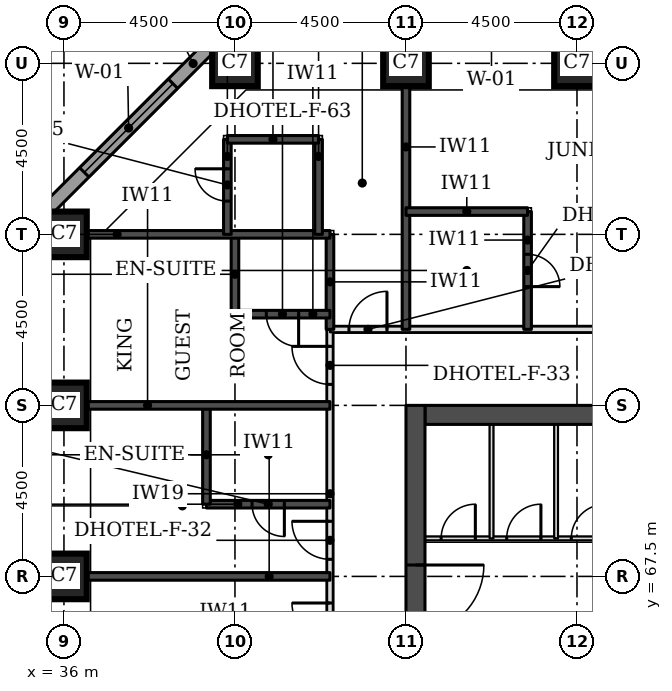
"""IFC4 building model, lengths in metres.
Left out: names, types, materials, properties, quantities, classifications, styles, units other than length and angle.
Written with IfcOpenShell. Run it as: python <this file> out.ifc"""

import sys

from ifc_helpers import new_model, si_unit, direction, frame, frame_2d, origin, origin_2d, place, context, subcontext, project, spatial, rectangle, extrude, element, fill, save


model = new_model("IFC4")
c1 = context("Model", 3, precision=1e-05, world=origin(), true_north=direction((0.0, 1.0)))
c2 = subcontext(c1, "Body", "Model", "MODEL_VIEW")
j1 = project(units=[si_unit("LENGTHUNIT", "METRE"), si_unit("PLANEANGLEUNIT", "RADIAN")], contexts=[c1])
p1 = place(None, origin())
s1 = spatial("IfcSite", under=j1, at=p1, CompositionType="ELEMENT")
p2 = place(p1, origin())
s2 = spatial("IfcBuilding", under=s1, at=p2, CompositionType="ELEMENT")
p3 = place(p2, frame((0.0, 0.0, 42.9)))
s3 = spatial("IfcBuildingStorey", under=s2, at=p3, CompositionType="ELEMENT", Elevation=42.9)
for number, where, z_axis, x_axis in (
    (1, (36.0, 67.5, 0.0), (0.0, 0.0, 1.0), (1.0, 0.0, 0.0)),
    (2, (36.0, 72.0, 0.0), (0.0, 0.0, 1.0), (1.0, 0.0, 0.0)),
    (3, (36.0, 76.5, 0.0), (0.0, 0.0, 1.0), (1.0, 0.0, 0.0)),
    (4, (40.5, 81.0, 0.0), (0.0, 0.0, 1.0), (1.0, 0.0, 0.0)),
    (5, (45.0, 81.0, 0.0), (0.0, 0.0, 1.0), (1.0, 0.0, 0.0)),
    (6, (49.5, 81.0, 0.0), (0.0, 0.0, 1.0), (1.0, 0.0, 0.0)),
):
    element("IfcColumn", number, at=place(p3, frame(where, z_axis=z_axis, x_axis=x_axis)), inside=s3, PredefinedType="COLUMN", context=c2, shape_type="SweptSolid", body=[
        extrude(rectangle(XDim=1.2, YDim=1.2, at=origin_2d()), origin(), (0.0, 0.0, 1.0), 3.3),
    ])
p4 = place(p3, frame((45.5, 71.75, 0.0), z_axis=(0.0, 0.0, 1.0), x_axis=(1.0, 0.0, 0.0)))
e7 = element("IfcWall", 7, at=p4, inside=s3, PredefinedType="SHEAR", context=c2, shape_type="SweptSolid", body=[
    extrude(rectangle(XDim=21.5, YDim=0.5, at=frame_2d((10.75, 0.0))), origin(), (0.0, 0.0, 1.0), 3.3),
])
p5 = place(p3, frame((45.25, 49.5, 0.0), z_axis=(0.0, 0.0, 1.0), x_axis=(0.0, 1.0, 0.0)))
e8 = element("IfcWall", 8, at=p5, inside=s3, PredefinedType="SHEAR", context=c2, shape_type="SweptSolid", body=[
    extrude(rectangle(XDim=22.5, YDim=0.5, at=frame_2d((11.25, 0.0))), origin(), (0.0, 0.0, 1.0), 3.3),
])
p6 = place(p5, frame((4.2, 0.0, 0.0)))
e9 = element("IfcOpeningElement", 9, at=p6, cuts=e8, PredefinedType="OPENING", context=c2, shape_type="SweptSolid", body=[
    extrude(rectangle(XDim=1.8, YDim=2.1, at=frame_2d((0.9, 1.05))), frame((0.0, 0.26, 0.0), z_axis=(0.0, -1.0, 0.0), x_axis=(1.0, 0.0, 0.0)), (0.0, 0.0, 1.0), 0.52),
])
p7 = place(p5, frame((6.9, 0.0, 0.0)))
e10 = element("IfcOpeningElement", 10, at=p7, cuts=e8, PredefinedType="OPENING", context=c2, shape_type="SweptSolid", body=[
    extrude(rectangle(XDim=1.1, YDim=2.1, at=frame_2d((0.55, 1.05))), frame((0.0, 0.26, 0.0), z_axis=(0.0, -1.0, 0.0), x_axis=(1.0, 0.0, 0.0)), (0.0, 0.0, 1.0), 0.52),
])
p8 = place(p5, frame((13.6, 0.0, 0.0)))
e11 = element("IfcOpeningElement", 11, at=p8, cuts=e8, PredefinedType="OPENING", context=c2, shape_type="SweptSolid", body=[
    extrude(rectangle(XDim=1.1, YDim=2.1, at=frame_2d((0.55, 1.05))), frame((0.0, 0.26, 0.0), z_axis=(0.0, -1.0, 0.0), x_axis=(1.0, 0.0, 0.0)), (0.0, 0.0, 1.0), 0.52),
])
p9 = place(p5, frame((16.5, 0.0, 0.0)))
e12 = element("IfcOpeningElement", 12, at=p9, cuts=e8, PredefinedType="OPENING", context=c2, shape_type="SweptSolid", body=[
    extrude(rectangle(XDim=1.8, YDim=2.1, at=frame_2d((0.9, 1.05))), frame((0.0, 0.26, 0.0), z_axis=(0.0, -1.0, 0.0), x_axis=(1.0, 0.0, 0.0)), (0.0, 0.0, 1.0), 0.52),
])
p10 = place(p3, frame((40.23, 81.826, 0.0), z_axis=(0.0, 0.0, 1.0), x_axis=(-0.707106781187, -0.707106781187, 0.0)))
e13 = element("IfcWall", 13, at=p10, inside=s3, PredefinedType="STANDARD", context=c2, shape_type="SweptSolid", body=[
    extrude(rectangle(XDim=7.151, YDim=0.35, at=frame_2d((3.576, 0.0))), origin(), (0.0, 0.0, 1.0), 3.055),
])
p11 = place(p10, frame((1.926, 0.0, 0.8)))
e14 = element("IfcOpeningElement", 14, at=p11, cuts=e13, PredefinedType="OPENING", context=c2, shape_type="SweptSolid", body=[
    extrude(rectangle(XDim=3.3, YDim=1.5, at=frame_2d((1.65, 0.75))), frame((0.0, 0.185, 0.0), z_axis=(0.0, -1.0, 0.0), x_axis=(1.0, 0.0, 0.0)), (0.0, 0.0, 1.0), 0.37),
])
p12 = place(p3, frame((43.0, 57.35, 0.0), z_axis=(0.0, 0.0, 1.0), x_axis=(0.0, 1.0, 0.0)))
e15 = element("IfcWall", 15, at=p12, inside=s3, PredefinedType="PARTITIONING", context=c2, shape_type="SweptSolid", body=[
    extrude(rectangle(XDim=16.65, YDim=0.15, at=frame_2d((8.325, 0.0))), origin(), (0.0, 0.0, 1.0), 3.08),
])
p13 = place(p12, frame((8.45, 0.0, 0.0)))
e16 = element("IfcOpeningElement", 16, at=p13, cuts=e15, PredefinedType="OPENING", context=c2, shape_type="SweptSolid", body=[
    extrude(rectangle(XDim=1.0, YDim=2.1, at=frame_2d((0.5, 1.05))), frame((0.0, 0.085, 0.0), z_axis=(0.0, -1.0, 0.0), x_axis=(1.0, 0.0, 0.0)), (0.0, 0.0, 1.0), 0.17),
])
p14 = place(p12, frame((10.6, 0.0, 0.0)))
e17 = element("IfcOpeningElement", 17, at=p14, cuts=e15, PredefinedType="OPENING", context=c2, shape_type="SweptSolid", body=[
    extrude(rectangle(XDim=1.0, YDim=2.1, at=frame_2d((0.5, 1.05))), frame((0.0, 0.085, 0.0), z_axis=(0.0, -1.0, 0.0), x_axis=(1.0, 0.0, 0.0)), (0.0, 0.0, 1.0), 0.17),
])
p15 = place(p12, frame((15.203, 0.0, 0.0)))
e18 = element("IfcOpeningElement", 18, at=p15, cuts=e15, PredefinedType="OPENING", context=c2, shape_type="SweptSolid", body=[
    extrude(rectangle(XDim=1.0, YDim=2.1, at=frame_2d((0.5, 1.05))), frame((0.0, 0.085, 0.0), z_axis=(0.0, -1.0, 0.0), x_axis=(1.0, 0.0, 0.0)), (0.0, 0.0, 1.0), 0.17),
])
p16 = place(p3, frame((43.0, 74.0, 0.0), z_axis=(0.0, 0.0, 1.0), x_axis=(1.0, 0.0, 0.0)))
e19 = element("IfcWall", 19, at=p16, inside=s3, PredefinedType="PARTITIONING", context=c2, shape_type="SweptSolid", body=[
    extrude(rectangle(XDim=26.5, YDim=0.15, at=frame_2d((13.25, 0.0))), origin(), (0.0, 0.0, 1.0), 3.08),
])
p17 = place(p16, frame((7.6, 0.0, 0.0)))
e20 = element("IfcOpeningElement", 20, at=p17, cuts=e19, PredefinedType="OPENING", context=c2, shape_type="SweptSolid", body=[
    extrude(rectangle(XDim=1.0, YDim=2.1, at=frame_2d((0.5, 1.05))), frame((0.0, 0.085, 0.0), z_axis=(0.0, -1.0, 0.0), x_axis=(1.0, 0.0, 0.0)), (0.0, 0.0, 1.0), 0.17),
])
p18 = place(p16, frame((13.65, 0.0, 0.0)))
e21 = element("IfcOpeningElement", 21, at=p18, cuts=e19, PredefinedType="OPENING", context=c2, shape_type="SweptSolid", body=[
    extrude(rectangle(XDim=1.0, YDim=2.1, at=frame_2d((0.5, 1.05))), frame((0.0, 0.085, 0.0), z_axis=(0.0, -1.0, 0.0), x_axis=(1.0, 0.0, 0.0)), (0.0, 0.0, 1.0), 0.17),
])
p19 = place(p16, frame((23.05, 0.0, 0.0)))
e22 = element("IfcOpeningElement", 22, at=p19, cuts=e19, PredefinedType="OPENING", context=c2, shape_type="SweptSolid", body=[
    extrude(rectangle(XDim=1.0, YDim=2.1, at=frame_2d((0.5, 1.05))), frame((0.0, 0.085, 0.0), z_axis=(0.0, -1.0, 0.0), x_axis=(1.0, 0.0, 0.0)), (0.0, 0.0, 1.0), 0.17),
])
p20 = place(p16, frame((0.5, 0.0, 0.0)))
e23 = element("IfcOpeningElement", 23, at=p20, cuts=e19, PredefinedType="OPENING", context=c2, shape_type="SweptSolid", body=[
    extrude(rectangle(XDim=1.0, YDim=2.1, at=frame_2d((0.5, 1.05))), frame((0.0, 0.085, 0.0), z_axis=(0.0, -1.0, 0.0), x_axis=(1.0, 0.0, 0.0)), (0.0, 0.0, 1.0), 0.17),
])
p21 = place(p16, frame((25.0, 0.0, 0.0)))
e24 = element("IfcOpeningElement", 24, at=p21, cuts=e19, PredefinedType="OPENING", context=c2, shape_type="SweptSolid", body=[
    extrude(rectangle(XDim=1.0, YDim=2.1, at=frame_2d((0.5, 1.05))), frame((0.0, 0.085, 0.0), z_axis=(0.0, -1.0, 0.0), x_axis=(1.0, 0.0, 0.0)), (0.0, 0.0, 1.0), 0.17),
])
p22 = place(p3, frame((36.6, 67.5, 0.0), z_axis=(0.0, 0.0, 1.0), x_axis=(1.0, 0.0, 0.0)))
e25 = element("IfcWall", 25, at=p22, inside=s3, PredefinedType="SOLIDWALL", context=c2, shape_type="SweptSolid", body=[
    extrude(rectangle(XDim=6.4, YDim=0.2, at=frame_2d((3.2, 0.0))), origin(), (0.0, 0.0, 1.0), 3.08),
])
p23 = place(p3, frame((39.75, 69.4, 0.0), z_axis=(0.0, 0.0, 1.0), x_axis=(1.0, 0.0, 0.0)))
e26 = element("IfcWall", 26, at=p23, inside=s3, PredefinedType="SOLIDWALL", context=c2, shape_type="SweptSolid", body=[
    extrude(rectangle(XDim=3.25, YDim=0.2, at=frame_2d((1.625, 0.0))), origin(), (0.0, 0.0, 1.0), 3.08),
])
p24 = place(p23, frame((1.2, 0.0, 0.0)))
e27 = element("IfcOpeningElement", 27, at=p24, cuts=e26, PredefinedType="OPENING", context=c2, shape_type="SweptSolid", body=[
    extrude(rectangle(XDim=0.85, YDim=2.1, at=frame_2d((0.425, 1.05))), frame((0.0, 0.11, 0.0), z_axis=(0.0, -1.0, 0.0), x_axis=(1.0, 0.0, 0.0)), (0.0, 0.0, 1.0), 0.22),
])
p25 = place(p3, frame((39.75, 69.4, 0.0), z_axis=(0.0, 0.0, 1.0), x_axis=(0.0, 1.0, 0.0)))
e28 = element("IfcWall", 28, at=p25, inside=s3, PredefinedType="SOLIDWALL", context=c2, shape_type="SweptSolid", body=[
    extrude(rectangle(XDim=2.6, YDim=0.2, at=frame_2d((1.3, 0.0))), origin(), (0.0, 0.0, 1.0), 3.08),
])
p26 = place(p3, frame((36.6, 72.0, 0.0), z_axis=(0.0, 0.0, 1.0), x_axis=(1.0, 0.0, 0.0)))
e29 = element("IfcWall", 29, at=p26, inside=s3, PredefinedType="SOLIDWALL", context=c2, shape_type="SweptSolid", body=[
    extrude(rectangle(XDim=6.4, YDim=0.2, at=frame_2d((3.2, 0.0))), origin(), (0.0, 0.0, 1.0), 3.08),
])
p27 = place(p3, frame((43.0, 74.0, 0.0), z_axis=(0.0, 0.0, 1.0), x_axis=(0.0, 1.0, 0.0)))
e30 = element("IfcWall", 30, at=p27, inside=s3, PredefinedType="SOLIDWALL", context=c2, shape_type="SweptSolid", body=[
    extrude(rectangle(XDim=2.5, YDim=0.2, at=frame_2d((1.25, 0.0))), origin(), (0.0, 0.0, 1.0), 3.08),
])
p28 = place(p3, frame((45.0, 74.0, 0.0), z_axis=(0.0, 0.0, 1.0), x_axis=(0.0, 1.0, 0.0)))
e31 = element("IfcWall", 31, at=p28, inside=s3, PredefinedType="SOLIDWALL", context=c2, shape_type="SweptSolid", body=[
    extrude(rectangle(XDim=6.4, YDim=0.2, at=frame_2d((3.2, 0.0))), origin(), (0.0, 0.0, 1.0), 3.08),
])
p29 = place(p3, frame((48.2, 74.0, 0.0), z_axis=(0.0, 0.0, 1.0), x_axis=(0.0, 1.0, 0.0)))
e32 = element("IfcWall", 32, at=p29, inside=s3, PredefinedType="SOLIDWALL", context=c2, shape_type="SweptSolid", body=[
    extrude(rectangle(XDim=3.1, YDim=0.2, at=frame_2d((1.55, 0.0))), origin(), (0.0, 0.0, 1.0), 3.08),
])
p30 = place(p29, frame((1.125, 0.0, 0.0)))
e33 = element("IfcOpeningElement", 33, at=p30, cuts=e32, PredefinedType="OPENING", context=c2, shape_type="SweptSolid", body=[
    extrude(rectangle(XDim=0.85, YDim=2.1, at=frame_2d((0.425, 1.05))), frame((0.0, 0.11, 0.0), z_axis=(0.0, -1.0, 0.0), x_axis=(1.0, 0.0, 0.0)), (0.0, 0.0, 1.0), 0.22),
])
p31 = place(p3, frame((40.5, 74.4, 0.0), z_axis=(0.0, 0.0, 1.0), x_axis=(1.0, 0.0, 0.0)))
e34 = element("IfcWall", 34, at=p31, inside=s3, PredefinedType="SOLIDWALL", context=c2, shape_type="SweptSolid", body=[
    extrude(rectangle(XDim=2.5, YDim=0.2, at=frame_2d((1.25, 0.0))), origin(), (0.0, 0.0, 1.0), 3.08),
])
p32 = place(p31, frame((0.825, 0.0, 0.0)))
e35 = element("IfcOpeningElement", 35, at=p32, cuts=e34, PredefinedType="OPENING", context=c2, shape_type="SweptSolid", body=[
    extrude(rectangle(XDim=0.85, YDim=2.1, at=frame_2d((0.425, 1.05))), frame((0.0, 0.11, 0.0), z_axis=(0.0, -1.0, 0.0), x_axis=(1.0, 0.0, 0.0)), (0.0, 0.0, 1.0), 0.22),
])
p33 = place(p3, frame((40.5, 74.4, 0.0), z_axis=(0.0, 0.0, 1.0), x_axis=(0.0, 1.0, 0.0)))
e36 = element("IfcWall", 36, at=p33, inside=s3, PredefinedType="SOLIDWALL", context=c2, shape_type="SweptSolid", body=[
    extrude(rectangle(XDim=2.1, YDim=0.2, at=frame_2d((1.05, 0.0))), origin(), (0.0, 0.0, 1.0), 3.08),
])
p34 = place(p3, frame((36.6, 76.5, 0.0), z_axis=(0.0, 0.0, 1.0), x_axis=(1.0, 0.0, 0.0)))
e37 = element("IfcWall", 37, at=p34, inside=s3, PredefinedType="SOLIDWALL", context=c2, shape_type="SweptSolid", body=[
    extrude(rectangle(XDim=6.4, YDim=0.2, at=frame_2d((3.2, 0.0))), origin(), (0.0, 0.0, 1.0), 3.08),
])
p35 = place(p3, frame((40.3, 76.5, 0.0), z_axis=(0.0, 0.0, 1.0), x_axis=(0.0, 1.0, 0.0)))
e38 = element("IfcWall", 38, at=p35, inside=s3, PredefinedType="SOLIDWALL", context=c2, shape_type="SweptSolid", body=[
    extrude(rectangle(XDim=2.5, YDim=0.2, at=frame_2d((1.25, 0.0))), origin(), (0.0, 0.0, 1.0), 3.08),
])
p36 = place(p35, frame((0.875, 0.0, 0.0)))
e39 = element("IfcOpeningElement", 39, at=p36, cuts=e38, PredefinedType="OPENING", context=c2, shape_type="SweptSolid", body=[
    extrude(rectangle(XDim=0.85, YDim=2.1, at=frame_2d((0.425, 1.05))), frame((0.0, 0.11, 0.0), z_axis=(0.0, -1.0, 0.0), x_axis=(1.0, 0.0, 0.0)), (0.0, 0.0, 1.0), 0.22),
])
p37 = place(p3, frame((42.7, 76.5, 0.0), z_axis=(0.0, 0.0, 1.0), x_axis=(0.0, 1.0, 0.0)))
e40 = element("IfcWall", 40, at=p37, inside=s3, PredefinedType="SOLIDWALL", context=c2, shape_type="SweptSolid", body=[
    extrude(rectangle(XDim=2.5, YDim=0.2, at=frame_2d((1.25, 0.0))), origin(), (0.0, 0.0, 1.0), 3.08),
])
p38 = place(p3, frame((45.0, 77.1, 0.0), z_axis=(0.0, 0.0, 1.0), x_axis=(1.0, 0.0, 0.0)))
e41 = element("IfcWall", 41, at=p38, inside=s3, PredefinedType="SOLIDWALL", context=c2, shape_type="SweptSolid", body=[
    extrude(rectangle(XDim=3.2, YDim=0.2, at=frame_2d((1.6, 0.0))), origin(), (0.0, 0.0, 1.0), 3.08),
])
p39 = place(p3, frame((40.3, 79.0, 0.0), z_axis=(0.0, 0.0, 1.0), x_axis=(1.0, 0.0, 0.0)))
e42 = element("IfcWall", 42, at=p39, inside=s3, PredefinedType="SOLIDWALL", context=c2, shape_type="SweptSolid", body=[
    extrude(rectangle(XDim=2.4, YDim=0.2, at=frame_2d((1.2, 0.0))), origin(), (0.0, 0.0, 1.0), 3.08),
])
p40 = place(p3, frame((45.5, 68.5, 0.0), z_axis=(0.0, 0.0, 1.0), x_axis=(1.0, 0.0, 0.0)))
e43 = element("IfcWall", 43, at=p40, inside=s3, PredefinedType="PARTITIONING", context=c2, shape_type="SweptSolid", body=[
    extrude(rectangle(XDim=5.15, YDim=0.1, at=frame_2d((2.575, 0.0))), origin(), (0.0, 0.0, 1.0), 3.08),
])
p41 = place(p40, frame((0.426, 0.0, 0.0)))
e44 = element("IfcOpeningElement", 44, at=p41, cuts=e43, PredefinedType="OPENING", context=c2, shape_type="SweptSolid", body=[
    extrude(rectangle(XDim=0.9, YDim=2.1, at=frame_2d((0.45, 1.05))), frame((0.0, 0.06, 0.0), z_axis=(0.0, -1.0, 0.0), x_axis=(1.0, 0.0, 0.0)), (0.0, 0.0, 1.0), 0.12),
])
p42 = place(p40, frame((2.151, 0.0, 0.0)))
e45 = element("IfcOpeningElement", 45, at=p42, cuts=e43, PredefinedType="OPENING", context=c2, shape_type="SweptSolid", body=[
    extrude(rectangle(XDim=0.9, YDim=2.1, at=frame_2d((0.45, 1.05))), frame((0.0, 0.06, 0.0), z_axis=(0.0, -1.0, 0.0), x_axis=(1.0, 0.0, 0.0)), (0.0, 0.0, 1.0), 0.12),
])
p43 = place(p40, frame((3.85, 0.0, 0.0)))
e46 = element("IfcOpeningElement", 46, at=p43, cuts=e43, PredefinedType="OPENING", context=c2, shape_type="SweptSolid", body=[
    extrude(rectangle(XDim=0.9, YDim=2.1, at=frame_2d((0.45, 1.05))), frame((0.0, 0.06, 0.0), z_axis=(0.0, -1.0, 0.0), x_axis=(1.0, 0.0, 0.0)), (0.0, 0.0, 1.0), 0.12),
])
for number, where, z_axis, x_axis in (
    (47, (47.251, 68.5, 0.0), (0.0, 0.0, 1.0), (0.0, 1.0, 0.0)),
    (48, (48.95, 68.5, 0.0), (0.0, 0.0, 1.0), (0.0, 1.0, 0.0)),
):
    element("IfcWall", number, at=place(p3, frame(where, z_axis=z_axis, x_axis=x_axis)), inside=s3, PredefinedType="PARTITIONING", context=c2, shape_type="SweptSolid", body=[
        extrude(rectangle(XDim=3.0, YDim=0.1, at=frame_2d((1.5, 0.0))), origin(), (0.0, 0.0, 1.0), 3.08),
    ])
p44 = place(p11, origin())
e49 = element("IfcWindow", 49, at=p44, inside=s3, PartitioningType="SINGLE_PANEL", PredefinedType="WINDOW", context=c2, shape_type="SweptSolid", body=[
    extrude(rectangle(XDim=3.3, YDim=1.5, at=frame_2d((1.65, 0.75))), frame((0.0, 0.085, 0.0), z_axis=(0.0, -1.0, 0.0), x_axis=(1.0, 0.0, 0.0)), (0.0, 0.0, 1.0), 0.06),
])
fill(e14, e49)
p45 = place(p13, origin())
e50 = element("IfcDoor", 50, at=p45, inside=s3, OperationType="SINGLE_SWING_RIGHT", PredefinedType="DOOR", context=c2, shape_type="SweptSolid", body=[
    extrude(rectangle(XDim=1.0, YDim=2.1, at=frame_2d((0.5, 1.05))), frame((0.0, 0.025, 0.0), z_axis=(0.0, -1.0, 0.0), x_axis=(1.0, 0.0, 0.0)), (0.0, 0.0, 1.0), 0.05),
])
fill(e16, e50)
p46 = place(p14, origin())
e51 = element("IfcDoor", 51, at=p46, inside=s3, OperationType="SINGLE_SWING_RIGHT", PredefinedType="DOOR", context=c2, shape_type="SweptSolid", body=[
    extrude(rectangle(XDim=1.0, YDim=2.1, at=frame_2d((0.5, 1.05))), frame((0.0, 0.025, 0.0), z_axis=(0.0, -1.0, 0.0), x_axis=(1.0, 0.0, 0.0)), (0.0, 0.0, 1.0), 0.05),
])
fill(e17, e51)
p47 = place(p24, frame((0.85, 0.0, 0.0), z_axis=(0.0, 0.0, 1.0), x_axis=(-1.0, 0.0, 0.0)))
e52 = element("IfcDoor", 52, at=p47, inside=s3, OperationType="SINGLE_SWING_LEFT", PredefinedType="DOOR", context=c2, shape_type="SweptSolid", body=[
    extrude(rectangle(XDim=0.85, YDim=2.1, at=frame_2d((0.425, 1.05))), frame((0.0, 0.025, 0.0), z_axis=(0.0, -1.0, 0.0), x_axis=(1.0, 0.0, 0.0)), (0.0, 0.0, 1.0), 0.05),
])
fill(e27, e52)
p48 = place(p15, origin())
e53 = element("IfcDoor", 53, at=p48, inside=s3, OperationType="SINGLE_SWING_RIGHT", PredefinedType="DOOR", context=c2, shape_type="SweptSolid", body=[
    extrude(rectangle(XDim=1.0, YDim=2.1, at=frame_2d((0.5, 1.05))), frame((0.0, 0.025, 0.0), z_axis=(0.0, -1.0, 0.0), x_axis=(1.0, 0.0, 0.0)), (0.0, 0.0, 1.0), 0.05),
])
fill(e18, e53)
p49 = place(p32, frame((0.85, 0.0, 0.0), z_axis=(0.0, 0.0, 1.0), x_axis=(-1.0, 0.0, 0.0)))
e54 = element("IfcDoor", 54, at=p49, inside=s3, OperationType="SINGLE_SWING_LEFT", PredefinedType="DOOR", context=c2, shape_type="SweptSolid", body=[
    extrude(rectangle(XDim=0.85, YDim=2.1, at=frame_2d((0.425, 1.05))), frame((0.0, 0.025, 0.0), z_axis=(0.0, -1.0, 0.0), x_axis=(1.0, 0.0, 0.0)), (0.0, 0.0, 1.0), 0.05),
])
fill(e35, e54)
p50 = place(p30, frame((0.85, 0.0, 0.0), z_axis=(0.0, 0.0, 1.0), x_axis=(-1.0, 0.0, 0.0)))
e55 = element("IfcDoor", 55, at=p50, inside=s3, OperationType="SINGLE_SWING_RIGHT", PredefinedType="DOOR", context=c2, shape_type="SweptSolid", body=[
    extrude(rectangle(XDim=0.85, YDim=2.1, at=frame_2d((0.425, 1.05))), frame((0.0, 0.025, 0.0), z_axis=(0.0, -1.0, 0.0), x_axis=(1.0, 0.0, 0.0)), (0.0, 0.0, 1.0), 0.05),
])
fill(e33, e55)
p51 = place(p20, origin())
e56 = element("IfcDoor", 56, at=p51, inside=s3, OperationType="SINGLE_SWING_RIGHT", PredefinedType="DOOR", context=c2, shape_type="SweptSolid", body=[
    extrude(rectangle(XDim=1.0, YDim=2.1, at=frame_2d((0.5, 1.05))), frame((0.0, 0.025, 0.0), z_axis=(0.0, -1.0, 0.0), x_axis=(1.0, 0.0, 0.0)), (0.0, 0.0, 1.0), 0.05),
])
fill(e23, e56)
p52 = place(p36, origin())
e57 = element("IfcDoor", 57, at=p52, inside=s3, OperationType="SINGLE_SWING_RIGHT", PredefinedType="DOOR", context=c2, shape_type="SweptSolid", body=[
    extrude(rectangle(XDim=0.85, YDim=2.1, at=frame_2d((0.425, 1.05))), frame((0.0, 0.025, 0.0), z_axis=(0.0, -1.0, 0.0), x_axis=(1.0, 0.0, 0.0)), (0.0, 0.0, 1.0), 0.05),
])
fill(e39, e57)
p53 = place(p9, frame((1.8, 0.0, 0.0), z_axis=(0.0, 0.0, 1.0), x_axis=(-1.0, 0.0, 0.0)))
e58 = element("IfcDoor", 58, at=p53, inside=s3, OperationType="SINGLE_SWING_LEFT", PredefinedType="DOOR", context=c2, shape_type="SweptSolid", body=[
    extrude(rectangle(XDim=1.8, YDim=2.1, at=frame_2d((0.9, 1.05))), frame((0.0, 0.025, 0.0), z_axis=(0.0, -1.0, 0.0), x_axis=(1.0, 0.0, 0.0)), (0.0, 0.0, 1.0), 0.05),
])
fill(e12, e58)
p54 = place(p41, origin())
e59 = element("IfcDoor", 59, at=p54, inside=s3, OperationType="SINGLE_SWING_RIGHT", PredefinedType="DOOR", context=c2, shape_type="SweptSolid", body=[
    extrude(rectangle(XDim=0.9, YDim=2.1, at=frame_2d((0.45, 1.05))), frame((0.0, 0.025, 0.0), z_axis=(0.0, -1.0, 0.0), x_axis=(1.0, 0.0, 0.0)), (0.0, 0.0, 1.0), 0.05),
])
fill(e44, e59)
p55 = place(p42, origin())
e60 = element("IfcDoor", 60, at=p55, inside=s3, OperationType="SINGLE_SWING_RIGHT", PredefinedType="DOOR", context=c2, shape_type="SweptSolid", body=[
    extrude(rectangle(XDim=0.9, YDim=2.1, at=frame_2d((0.45, 1.05))), frame((0.0, 0.025, 0.0), z_axis=(0.0, -1.0, 0.0), x_axis=(1.0, 0.0, 0.0)), (0.0, 0.0, 1.0), 0.05),
])
fill(e45, e60)
p56 = place(p43, origin())
e61 = element("IfcDoor", 61, at=p56, inside=s3, OperationType="SINGLE_SWING_RIGHT", PredefinedType="DOOR", context=c2, shape_type="SweptSolid", body=[
    extrude(rectangle(XDim=0.9, YDim=2.1, at=frame_2d((0.45, 1.05))), frame((0.0, 0.025, 0.0), z_axis=(0.0, -1.0, 0.0), x_axis=(1.0, 0.0, 0.0)), (0.0, 0.0, 1.0), 0.05),
])
fill(e46, e61)
save(model, sys.argv[1])
